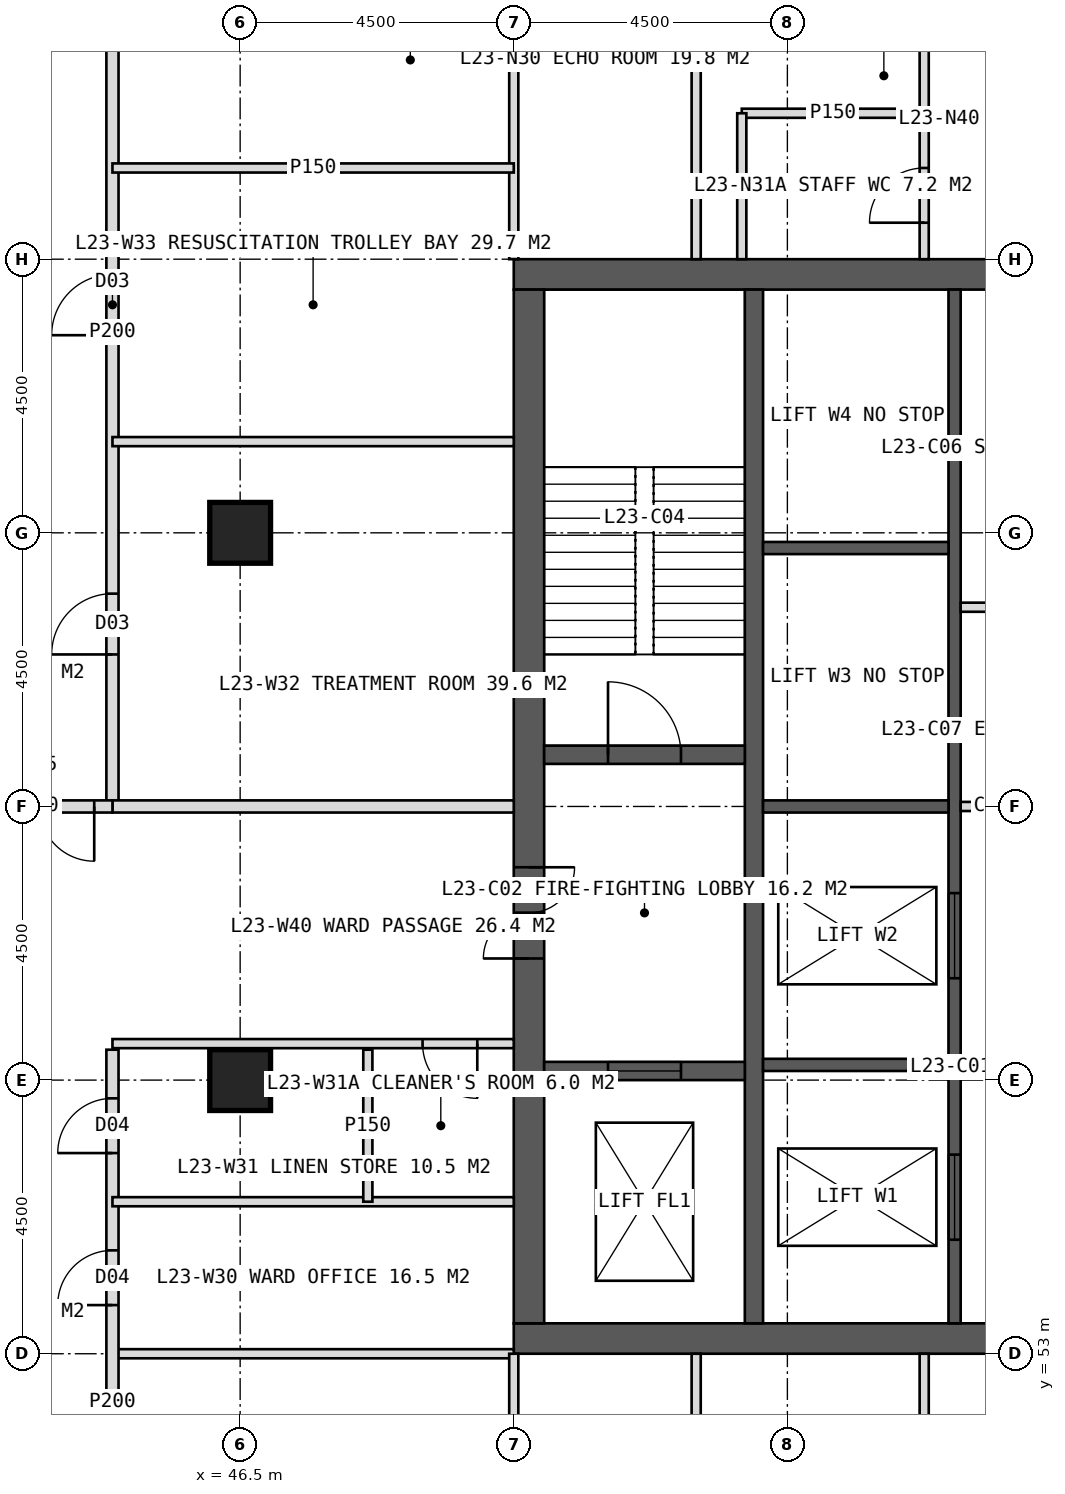
"""IFC4 building model, lengths in metres.
Left out: names, types, materials, properties, quantities, classifications, styles, units other than length and angle.
Written with IfcOpenShell. Run it as: python <this file> out.ifc"""

import sys

from ifc_helpers import new_model, si_unit, direction, frame, frame_2d, origin, origin_2d, place, context, subcontext, project, spatial, rectangle, hollow_rectangle, extrude, element, fill, save


model = new_model("IFC4")
c1 = context("Model", 3, precision=1e-05, world=origin(), true_north=direction((0.0, 1.0)))
c2 = subcontext(c1, "Body", "Model", "MODEL_VIEW")
j1 = project(units=[si_unit("LENGTHUNIT", "METRE"), si_unit("PLANEANGLEUNIT", "RADIAN")], contexts=[c1])
p1 = place(None, origin())
s1 = spatial("IfcSite", under=j1, at=p1, CompositionType="ELEMENT")
p2 = place(p1, origin())
s2 = spatial("IfcBuilding", under=s1, at=p2, CompositionType="ELEMENT")
p3 = place(p2, frame((0.0, 0.0, 100.0)))
s3 = spatial("IfcBuildingStorey", under=s2, at=p3, CompositionType="ELEMENT", Elevation=100.0)
p4 = place(p3, frame((51.0, 70.75, 0.0), z_axis=(0.0, 0.0, 1.0), x_axis=(1.0, 0.0, 0.0)))
e1 = element("IfcWall", 1, at=p4, inside=s3, PredefinedType="SHEAR", context=c2, shape_type="SweptSolid", body=[
    extrude(rectangle(XDim=18.0, YDim=0.5, at=frame_2d((9.0, 0.0))), origin(), (0.0, 0.0, 1.0), 4.0),
])
p5 = place(p4, frame((8.1, 0.0, 0.0)))
e2 = element("IfcOpeningElement", 2, at=p5, cuts=e1, PredefinedType="OPENING", context=c2, shape_type="SweptSolid", body=[
    extrude(rectangle(XDim=1.8, YDim=2.2, at=frame_2d((0.9, 1.1))), frame((0.0, 0.26, 0.0), z_axis=(0.0, -1.0, 0.0), x_axis=(1.0, 0.0, 0.0)), (0.0, 0.0, 1.0), 0.52),
])
p6 = place(p3, frame((51.0, 53.25, 0.0), z_axis=(0.0, 0.0, 1.0), x_axis=(1.0, 0.0, 0.0)))
e3 = element("IfcWall", 3, at=p6, inside=s3, PredefinedType="SHEAR", context=c2, shape_type="SweptSolid", body=[
    extrude(rectangle(XDim=18.0, YDim=0.5, at=frame_2d((9.0, 0.0))), origin(), (0.0, 0.0, 1.0), 4.0),
])
p7 = place(p6, frame((8.1, 0.0, 0.0)))
e4 = element("IfcOpeningElement", 4, at=p7, cuts=e3, PredefinedType="OPENING", context=c2, shape_type="SweptSolid", body=[
    extrude(rectangle(XDim=1.8, YDim=2.2, at=frame_2d((0.9, 1.1))), frame((0.0, 0.26, 0.0), z_axis=(0.0, -1.0, 0.0), x_axis=(1.0, 0.0, 0.0)), (0.0, 0.0, 1.0), 0.52),
])
p8 = place(p3, frame((51.25, 53.5, 0.0), z_axis=(0.0, 0.0, 1.0), x_axis=(0.0, 1.0, 0.0)))
e5 = element("IfcWall", 5, at=p8, inside=s3, PredefinedType="SHEAR", context=c2, shape_type="SweptSolid", body=[
    extrude(rectangle(XDim=17.0, YDim=0.5, at=frame_2d((8.5, 0.0))), origin(), (0.0, 0.0, 1.0), 4.0),
])
p9 = place(p8, frame((6.0, 0.0, 0.0)))
e6 = element("IfcOpeningElement", 6, at=p9, cuts=e5, PredefinedType="OPENING", context=c2, shape_type="SweptSolid", body=[
    extrude(rectangle(XDim=1.5, YDim=2.2, at=frame_2d((0.75, 1.1))), frame((0.0, 0.26, 0.0), z_axis=(0.0, -1.0, 0.0), x_axis=(1.0, 0.0, 0.0)), (0.0, 0.0, 1.0), 0.52),
])
p10 = place(p3, frame((54.95, 53.5, 0.0), z_axis=(0.0, 0.0, 1.0), x_axis=(0.0, 1.0, 0.0)))
e7 = element("IfcWall", 7, at=p10, inside=s3, PredefinedType="SHEAR", context=c2, shape_type="SweptSolid", body=[
    extrude(rectangle(XDim=17.0, YDim=0.3, at=frame_2d((8.5, 0.0))), origin(), (0.0, 0.0, 1.0), 4.0),
])
p11 = place(p3, frame((58.25, 53.5, 0.0), z_axis=(0.0, 0.0, 1.0), x_axis=(0.0, 1.0, 0.0)))
e8 = element("IfcWall", 8, at=p11, inside=s3, PredefinedType="SHEAR", context=c2, shape_type="SweptSolid", body=[
    extrude(rectangle(XDim=17.0, YDim=0.2, at=frame_2d((8.5, 0.0))), origin(), (0.0, 0.0, 1.0), 4.0),
])
p12 = place(p11, frame((1.375, 0.0, 0.0)))
e9 = element("IfcOpeningElement", 9, at=p12, cuts=e8, PredefinedType="OPENING", context=c2, shape_type="SweptSolid", body=[
    extrude(rectangle(XDim=1.4, YDim=2.2, at=frame_2d((0.7, 1.1))), frame((0.0, 0.11, 0.0), z_axis=(0.0, -1.0, 0.0), x_axis=(1.0, 0.0, 0.0)), (0.0, 0.0, 1.0), 0.22),
])
p13 = place(p11, frame((5.675, 0.0, 0.0)))
e10 = element("IfcOpeningElement", 10, at=p13, cuts=e8, PredefinedType="OPENING", context=c2, shape_type="SweptSolid", body=[
    extrude(rectangle(XDim=1.4, YDim=2.2, at=frame_2d((0.7, 1.1))), frame((0.0, 0.11, 0.0), z_axis=(0.0, -1.0, 0.0), x_axis=(1.0, 0.0, 0.0)), (0.0, 0.0, 1.0), 0.22),
])
for number, where, z_axis, x_axis in (
    (11, (55.1, 57.75, 0.0), (0.0, 0.0, 1.0), (1.0, 0.0, 0.0)),
    (12, (55.1, 62.0, 0.0), (0.0, 0.0, 1.0), (1.0, 0.0, 0.0)),
    (13, (55.1, 66.25, 0.0), (0.0, 0.0, 1.0), (1.0, 0.0, 0.0)),
):
    element("IfcWall", number, at=place(p3, frame(where, z_axis=z_axis, x_axis=x_axis)), inside=s3, PredefinedType="SHEAR", context=c2, shape_type="SweptSolid", body=[
        extrude(rectangle(XDim=3.05, YDim=0.2, at=frame_2d((1.525, 0.0))), origin(), (0.0, 0.0, 1.0), 4.0),
    ])
p14 = place(p3, frame((51.5, 62.85, 0.0), z_axis=(0.0, 0.0, 1.0), x_axis=(1.0, 0.0, 0.0)))
e14 = element("IfcWall", 14, at=p14, inside=s3, PredefinedType="SHEAR", context=c2, shape_type="SweptSolid", body=[
    extrude(rectangle(XDim=3.3, YDim=0.3, at=frame_2d((1.65, 0.0))), origin(), (0.0, 0.0, 1.0), 4.0),
])
p15 = place(p14, frame((1.05, 0.0, 0.0)))
e15 = element("IfcOpeningElement", 15, at=p15, cuts=e14, PredefinedType="OPENING", context=c2, shape_type="SweptSolid", body=[
    extrude(rectangle(XDim=1.2, YDim=2.1, at=frame_2d((0.6, 1.05))), frame((0.0, 0.16, 0.0), z_axis=(0.0, -1.0, 0.0), x_axis=(1.0, 0.0, 0.0)), (0.0, 0.0, 1.0), 0.32),
])
p16 = place(p3, frame((51.5, 57.65, 0.0), z_axis=(0.0, 0.0, 1.0), x_axis=(1.0, 0.0, 0.0)))
e16 = element("IfcWall", 16, at=p16, inside=s3, PredefinedType="SHEAR", context=c2, shape_type="SweptSolid", body=[
    extrude(rectangle(XDim=3.3, YDim=0.3, at=frame_2d((1.65, 0.0))), origin(), (0.0, 0.0, 1.0), 4.0),
])
p17 = place(p16, frame((1.05, 0.0, 0.0)))
e17 = element("IfcOpeningElement", 17, at=p17, cuts=e16, PredefinedType="OPENING", context=c2, shape_type="SweptSolid", body=[
    extrude(rectangle(XDim=1.2, YDim=2.2, at=frame_2d((0.6, 1.1))), frame((0.0, 0.16, 0.0), z_axis=(0.0, -1.0, 0.0), x_axis=(1.0, 0.0, 0.0)), (0.0, 0.0, 1.0), 0.32),
])
for number, where, z_axis, x_axis in (
    (18, (46.5, 57.5, 0.0), (0.0, 0.0, 1.0), (1.0, 0.0, 0.0)),
    (19, (46.5, 66.5, 0.0), (0.0, 0.0, 1.0), (1.0, 0.0, 0.0)),
):
    element("IfcColumn", number, at=place(p3, frame(where, z_axis=z_axis, x_axis=x_axis)), inside=s3, PredefinedType="COLUMN", context=c2, shape_type="SweptSolid", body=[
        extrude(hollow_rectangle(XDim=1.0, YDim=1.0, WallThickness=0.1, at=origin_2d()), origin(), (0.0, 0.0, 1.0), 4.0),
    ])
p18 = place(p3, frame((51.0, 71.0, 0.0), z_axis=(0.0, 0.0, 1.0), x_axis=(0.0, 1.0, 0.0)))
e20 = element("IfcWall", 20, at=p18, inside=s3, PredefinedType="PARTITIONING", context=c2, shape_type="SweptSolid", body=[
    extrude(rectangle(XDim=6.6, YDim=0.15, at=frame_2d((3.3, 0.0))), origin(), (0.0, 0.0, 1.0), 3.75),
])
p19 = place(p3, frame((57.75, 71.0, 0.0), z_axis=(0.0, 0.0, 1.0), x_axis=(0.0, 1.0, 0.0)))
e21 = element("IfcWall", 21, at=p19, inside=s3, PredefinedType="PARTITIONING", context=c2, shape_type="SweptSolid", body=[
    extrude(rectangle(XDim=6.6, YDim=0.15, at=frame_2d((3.3, 0.0))), origin(), (0.0, 0.0, 1.0), 3.75),
])
p20 = place(p19, frame((0.6, 0.0, 0.0)))
e22 = element("IfcOpeningElement", 22, at=p20, cuts=e21, PredefinedType="OPENING", context=c2, shape_type="SweptSolid", body=[
    extrude(rectangle(XDim=0.9, YDim=2.1, at=frame_2d((0.45, 1.05))), frame((0.0, 0.085, 0.0), z_axis=(0.0, -1.0, 0.0), x_axis=(1.0, 0.0, 0.0)), (0.0, 0.0, 1.0), 0.17),
])
p21 = place(p3, frame((54.0, 71.0, 0.0), z_axis=(0.0, 0.0, 1.0), x_axis=(0.0, 1.0, 0.0)))
e23 = element("IfcWall", 23, at=p21, inside=s3, PredefinedType="PARTITIONING", context=c2, shape_type="SweptSolid", body=[
    extrude(rectangle(XDim=6.6, YDim=0.15, at=frame_2d((3.3, 0.0))), origin(), (0.0, 0.0, 1.0), 3.75),
])
p22 = place(p3, frame((54.75, 73.4, 0.0), z_axis=(0.0, 0.0, 1.0), x_axis=(1.0, 0.0, 0.0)))
e24 = element("IfcWall", 24, at=p22, inside=s3, PredefinedType="PARTITIONING", context=c2, shape_type="SweptSolid", body=[
    extrude(rectangle(XDim=3.0, YDim=0.15, at=frame_2d((1.5, 0.0))), origin(), (0.0, 0.0, 1.0), 3.75),
])
p23 = place(p3, frame((54.75, 71.0, 0.0), z_axis=(0.0, 0.0, 1.0), x_axis=(0.0, 1.0, 0.0)))
e25 = element("IfcWall", 25, at=p23, inside=s3, PredefinedType="PARTITIONING", context=c2, shape_type="SweptSolid", body=[
    extrude(rectangle(XDim=2.4, YDim=0.15, at=frame_2d((1.2, 0.0))), origin(), (0.0, 0.0, 1.0), 3.75),
])
p24 = place(p3, frame((51.0, 53.0, 0.0), z_axis=(0.0, 0.0, 1.0), x_axis=(-1.0, 0.0, 0.0)))
e26 = element("IfcWall", 26, at=p24, inside=s3, PredefinedType="PARTITIONING", context=c2, shape_type="SweptSolid", body=[
    extrude(rectangle(XDim=6.6, YDim=0.15, at=frame_2d((3.3, 0.0))), origin(), (0.0, 0.0, 1.0), 3.75),
])
p25 = place(p3, frame((44.4, 46.4, 0.0), z_axis=(0.0, 0.0, 1.0), x_axis=(0.0, 1.0, 0.0)))
e27 = element("IfcWall", 27, at=p25, inside=s3, PredefinedType="PARTITIONING", context=c2, shape_type="SweptSolid", body=[
    extrude(rectangle(XDim=11.6, YDim=0.2, at=frame_2d((5.8, 0.0))), origin(), (0.0, 0.0, 1.0), 3.75),
])
p26 = place(p25, frame((7.4, 0.0, 0.0)))
e28 = element("IfcOpeningElement", 28, at=p26, cuts=e27, PredefinedType="OPENING", context=c2, shape_type="SweptSolid", body=[
    extrude(rectangle(XDim=0.9, YDim=2.1, at=frame_2d((0.45, 1.05))), frame((0.0, 0.11, 0.0), z_axis=(0.0, -1.0, 0.0), x_axis=(1.0, 0.0, 0.0)), (0.0, 0.0, 1.0), 0.22),
])
p27 = place(p25, frame((9.9, 0.0, 0.0)))
e29 = element("IfcOpeningElement", 29, at=p27, cuts=e27, PredefinedType="OPENING", context=c2, shape_type="SweptSolid", body=[
    extrude(rectangle(XDim=0.9, YDim=2.1, at=frame_2d((0.45, 1.05))), frame((0.0, 0.11, 0.0), z_axis=(0.0, -1.0, 0.0), x_axis=(1.0, 0.0, 0.0)), (0.0, 0.0, 1.0), 0.22),
])
p28 = place(p3, frame((44.4, 62.0, 0.0), z_axis=(0.0, 0.0, 1.0), x_axis=(0.0, 1.0, 0.0)))
e30 = element("IfcWall", 30, at=p28, inside=s3, PredefinedType="PARTITIONING", context=c2, shape_type="SweptSolid", body=[
    extrude(rectangle(XDim=15.6, YDim=0.2, at=frame_2d((7.8, 0.0))), origin(), (0.0, 0.0, 1.0), 3.75),
])
p29 = place(p28, frame((2.5, 0.0, 0.0)))
e31 = element("IfcOpeningElement", 31, at=p29, cuts=e30, PredefinedType="OPENING", context=c2, shape_type="SweptSolid", body=[
    extrude(rectangle(XDim=1.0, YDim=2.1, at=frame_2d((0.5, 1.05))), frame((0.0, 0.11, 0.0), z_axis=(0.0, -1.0, 0.0), x_axis=(1.0, 0.0, 0.0)), (0.0, 0.0, 1.0), 0.22),
])
p30 = place(p28, frame((7.75, 0.0, 0.0)))
e32 = element("IfcOpeningElement", 32, at=p30, cuts=e30, PredefinedType="OPENING", context=c2, shape_type="SweptSolid", body=[
    extrude(rectangle(XDim=1.0, YDim=2.1, at=frame_2d((0.5, 1.05))), frame((0.0, 0.11, 0.0), z_axis=(0.0, -1.0, 0.0), x_axis=(1.0, 0.0, 0.0)), (0.0, 0.0, 1.0), 0.22),
])
p31 = place(p28, frame((12.55, 0.0, 0.0)))
e33 = element("IfcOpeningElement", 33, at=p31, cuts=e30, PredefinedType="OPENING", context=c2, shape_type="SweptSolid", body=[
    extrude(rectangle(XDim=1.0, YDim=2.1, at=frame_2d((0.5, 1.05))), frame((0.0, 0.11, 0.0), z_axis=(0.0, -1.0, 0.0), x_axis=(1.0, 0.0, 0.0)), (0.0, 0.0, 1.0), 0.22),
])
p32 = place(p3, frame((51.0, 58.1, 0.0), z_axis=(0.0, 0.0, 1.0), x_axis=(-1.0, 0.0, 0.0)))
e34 = element("IfcWall", 34, at=p32, inside=s3, PredefinedType="PARTITIONING", context=c2, shape_type="SweptSolid", body=[
    extrude(rectangle(XDim=6.6, YDim=0.15, at=frame_2d((3.3, 0.0))), origin(), (0.0, 0.0, 1.0), 3.75),
])
p33 = place(p32, frame((0.6, 0.0, 0.0)))
e35 = element("IfcOpeningElement", 35, at=p33, cuts=e34, PredefinedType="OPENING", context=c2, shape_type="SweptSolid", body=[
    extrude(rectangle(XDim=0.9, YDim=2.1, at=frame_2d((0.45, 1.05))), frame((0.0, 0.085, 0.0), z_axis=(0.0, -1.0, 0.0), x_axis=(1.0, 0.0, 0.0)), (0.0, 0.0, 1.0), 0.17),
])
p34 = place(p3, frame((51.0, 62.0, 0.0), z_axis=(0.0, 0.0, 1.0), x_axis=(-1.0, 0.0, 0.0)))
e36 = element("IfcWall", 36, at=p34, inside=s3, PredefinedType="SOLIDWALL", context=c2, shape_type="SweptSolid", body=[
    extrude(rectangle(XDim=6.6, YDim=0.2, at=frame_2d((3.3, 0.0))), origin(), (0.0, 0.0, 1.0), 2.95),
])
for number, where, z_axis, x_axis in (
    (37, (51.0, 55.5, 0.0), (0.0, 0.0, 1.0), (-1.0, 0.0, 0.0)),
    (38, (51.0, 68.0, 0.0), (0.0, 0.0, 1.0), (-1.0, 0.0, 0.0)),
    (39, (51.0, 72.5, 0.0), (0.0, 0.0, 1.0), (-1.0, 0.0, 0.0)),
):
    element("IfcWall", number, at=place(p3, frame(where, z_axis=z_axis, x_axis=x_axis)), inside=s3, PredefinedType="PARTITIONING", context=c2, shape_type="SweptSolid", body=[
        extrude(rectangle(XDim=6.6, YDim=0.15, at=frame_2d((3.3, 0.0))), origin(), (0.0, 0.0, 1.0), 3.75),
    ])
p35 = place(p3, frame((48.6, 55.5, 0.0), z_axis=(0.0, 0.0, 1.0), x_axis=(0.0, 1.0, 0.0)))
e40 = element("IfcWall", 40, at=p35, inside=s3, PredefinedType="PARTITIONING", context=c2, shape_type="SweptSolid", body=[
    extrude(rectangle(XDim=2.5, YDim=0.15, at=frame_2d((1.25, 0.0))), origin(), (0.0, 0.0, 1.0), 3.75),
])
for number, where, z_axis, x_axis in (
    (41, (57.75, 53.0, 0.0), (0.0, 0.0, 1.0), (0.0, -1.0, 0.0)),
    (42, (54.0, 53.0, 0.0), (0.0, 0.0, 1.0), (0.0, -1.0, 0.0)),
    (43, (51.0, 53.0, 0.0), (0.0, 0.0, 1.0), (0.0, -1.0, 0.0)),
):
    element("IfcWall", number, at=place(p3, frame(where, z_axis=z_axis, x_axis=x_axis)), inside=s3, PredefinedType="PARTITIONING", context=c2, shape_type="SweptSolid", body=[
        extrude(rectangle(XDim=6.6, YDim=0.15, at=frame_2d((3.3, 0.0))), origin(), (0.0, 0.0, 1.0), 3.75),
    ])
p36 = place(p3, frame((44.4, 62.0, 0.0), z_axis=(0.0, 0.0, 1.0), x_axis=(-1.0, 0.0, 0.0)))
e44 = element("IfcWall", 44, at=p36, inside=s3, PredefinedType="SOLIDWALL", context=c2, shape_type="SweptSolid", body=[
    extrude(rectangle(XDim=2.7, YDim=0.2, at=frame_2d((1.35, 0.0))), origin(), (0.0, 0.0, 1.0), 2.95),
])
p37 = place(p36, frame((0.3, 0.0, 0.0)))
e45 = element("IfcOpeningElement", 45, at=p37, cuts=e44, PredefinedType="OPENING", context=c2, shape_type="SweptSolid", body=[
    extrude(rectangle(XDim=1.8, YDim=2.2, at=frame_2d((0.9, 1.1))), frame((0.0, 0.11, 0.0), z_axis=(0.0, -1.0, 0.0), x_axis=(1.0, 0.0, 0.0)), (0.0, 0.0, 1.0), 0.22),
])
p38 = place(p3, frame((58.35, 62.0, 0.0), z_axis=(0.0, 0.0, 1.0), x_axis=(1.0, 0.0, 0.0)))
e46 = element("IfcWall", 46, at=p38, inside=s3, PredefinedType="PARTITIONING", context=c2, shape_type="SweptSolid", body=[
    extrude(rectangle(XDim=3.3, YDim=0.15, at=frame_2d((1.65, 0.0))), origin(), (0.0, 0.0, 1.0), 3.75),
])
p39 = place(p38, frame((1.15, 0.0, 0.0)))
e47 = element("IfcOpeningElement", 47, at=p39, cuts=e46, PredefinedType="OPENING", context=c2, shape_type="SweptSolid", body=[
    extrude(rectangle(XDim=1.0, YDim=2.1, at=frame_2d((0.5, 1.05))), frame((0.0, 0.085, 0.0), z_axis=(0.0, -1.0, 0.0), x_axis=(1.0, 0.0, 0.0)), (0.0, 0.0, 1.0), 0.17),
])
p40 = place(p3, frame((58.35, 65.277, 0.0), z_axis=(0.0, 0.0, 1.0), x_axis=(1.0, 0.0, 0.0)))
e48 = element("IfcWall", 48, at=p40, inside=s3, PredefinedType="PARTITIONING", context=c2, shape_type="SweptSolid", body=[
    extrude(rectangle(XDim=3.3, YDim=0.15, at=frame_2d((1.65, 0.0))), origin(), (0.0, 0.0, 1.0), 3.75),
])
p41 = place(p20, origin())
e49 = element("IfcDoor", 49, at=p41, inside=s3, OperationType="SINGLE_SWING_LEFT", PredefinedType="DOOR", context=c2, shape_type="SweptSolid", body=[
    extrude(rectangle(XDim=0.9, YDim=2.1, at=frame_2d((0.45, 1.05))), frame((0.0, 0.025, 0.0), z_axis=(0.0, -1.0, 0.0), x_axis=(1.0, 0.0, 0.0)), (0.0, 0.0, 1.0), 0.05),
])
fill(e22, e49)
p42 = place(p26, origin())
e50 = element("IfcDoor", 50, at=p42, inside=s3, OperationType="SINGLE_SWING_LEFT", PredefinedType="DOOR", context=c2, shape_type="SweptSolid", body=[
    extrude(rectangle(XDim=0.9, YDim=2.1, at=frame_2d((0.45, 1.05))), frame((0.0, 0.025, 0.0), z_axis=(0.0, -1.0, 0.0), x_axis=(1.0, 0.0, 0.0)), (0.0, 0.0, 1.0), 0.05),
])
fill(e28, e50)
p43 = place(p33, origin())
e51 = element("IfcDoor", 51, at=p43, inside=s3, OperationType="SINGLE_SWING_LEFT", PredefinedType="DOOR", context=c2, shape_type="SweptSolid", body=[
    extrude(rectangle(XDim=0.9, YDim=2.1, at=frame_2d((0.45, 1.05))), frame((0.0, 0.025, 0.0), z_axis=(0.0, -1.0, 0.0), x_axis=(1.0, 0.0, 0.0)), (0.0, 0.0, 1.0), 0.05),
])
fill(e35, e51)
p44 = place(p27, origin())
e52 = element("IfcDoor", 52, at=p44, inside=s3, OperationType="SINGLE_SWING_LEFT", PredefinedType="DOOR", context=c2, shape_type="SweptSolid", body=[
    extrude(rectangle(XDim=0.9, YDim=2.1, at=frame_2d((0.45, 1.05))), frame((0.0, 0.025, 0.0), z_axis=(0.0, -1.0, 0.0), x_axis=(1.0, 0.0, 0.0)), (0.0, 0.0, 1.0), 0.05),
])
fill(e29, e52)
p45 = place(p29, origin())
e53 = element("IfcDoor", 53, at=p45, inside=s3, OperationType="SINGLE_SWING_LEFT", PredefinedType="DOOR", context=c2, shape_type="SweptSolid", body=[
    extrude(rectangle(XDim=1.0, YDim=2.1, at=frame_2d((0.5, 1.05))), frame((0.0, 0.025, 0.0), z_axis=(0.0, -1.0, 0.0), x_axis=(1.0, 0.0, 0.0)), (0.0, 0.0, 1.0), 0.05),
])
fill(e31, e53)
p46 = place(p30, origin())
e54 = element("IfcDoor", 54, at=p46, inside=s3, OperationType="SINGLE_SWING_LEFT", PredefinedType="DOOR", context=c2, shape_type="SweptSolid", body=[
    extrude(rectangle(XDim=1.0, YDim=2.1, at=frame_2d((0.5, 1.05))), frame((0.0, 0.025, 0.0), z_axis=(0.0, -1.0, 0.0), x_axis=(1.0, 0.0, 0.0)), (0.0, 0.0, 1.0), 0.05),
])
fill(e32, e54)
p47 = place(p37, origin())
e55 = element("IfcDoor", 55, at=p47, inside=s3, OperationType="DOUBLE_DOOR_DOUBLE_SWING", PredefinedType="DOOR", context=c2, shape_type="SweptSolid", body=[
    extrude(rectangle(XDim=1.8, YDim=2.2, at=frame_2d((0.9, 1.1))), frame((0.0, 0.025, 0.0), z_axis=(0.0, -1.0, 0.0), x_axis=(1.0, 0.0, 0.0)), (0.0, 0.0, 1.0), 0.05),
])
fill(e45, e55)
p48 = place(p9, origin())
e56 = element("IfcDoor", 56, at=p48, inside=s3, OperationType="DOUBLE_DOOR_SINGLE_SWING", PredefinedType="DOOR", context=c2, shape_type="SweptSolid", body=[
    extrude(rectangle(XDim=1.5, YDim=2.2, at=frame_2d((0.75, 1.1))), frame((0.0, 0.025, 0.0), z_axis=(0.0, -1.0, 0.0), x_axis=(1.0, 0.0, 0.0)), (0.0, 0.0, 1.0), 0.05),
])
fill(e6, e56)
p49 = place(p15, origin())
e57 = element("IfcDoor", 57, at=p49, inside=s3, OperationType="SINGLE_SWING_LEFT", PredefinedType="DOOR", context=c2, shape_type="SweptSolid", body=[
    extrude(rectangle(XDim=1.2, YDim=2.1, at=frame_2d((0.6, 1.05))), frame((0.0, 0.025, 0.0), z_axis=(0.0, -1.0, 0.0), x_axis=(1.0, 0.0, 0.0)), (0.0, 0.0, 1.0), 0.05),
])
fill(e15, e57)
p50 = place(p17, origin())
e58 = element("IfcDoor", 58, at=p50, inside=s3, OperationType="SLIDING_TO_LEFT", PredefinedType="DOOR", context=c2, shape_type="SweptSolid", body=[
    extrude(rectangle(XDim=1.2, YDim=2.2, at=frame_2d((0.6, 1.1))), frame((0.0, 0.025, 0.0), z_axis=(0.0, -1.0, 0.0), x_axis=(1.0, 0.0, 0.0)), (0.0, 0.0, 1.0), 0.05),
])
fill(e17, e58)
p51 = place(p12, origin())
e59 = element("IfcDoor", 59, at=p51, inside=s3, OperationType="SLIDING_TO_LEFT", PredefinedType="DOOR", context=c2, shape_type="SweptSolid", body=[
    extrude(rectangle(XDim=1.4, YDim=2.2, at=frame_2d((0.7, 1.1))), frame((0.0, 0.025, 0.0), z_axis=(0.0, -1.0, 0.0), x_axis=(1.0, 0.0, 0.0)), (0.0, 0.0, 1.0), 0.05),
])
fill(e9, e59)
p52 = place(p13, origin())
e60 = element("IfcDoor", 60, at=p52, inside=s3, OperationType="SLIDING_TO_LEFT", PredefinedType="DOOR", context=c2, shape_type="SweptSolid", body=[
    extrude(rectangle(XDim=1.4, YDim=2.2, at=frame_2d((0.7, 1.1))), frame((0.0, 0.025, 0.0), z_axis=(0.0, -1.0, 0.0), x_axis=(1.0, 0.0, 0.0)), (0.0, 0.0, 1.0), 0.05),
])
fill(e10, e60)
save(model, sys.argv[1])
